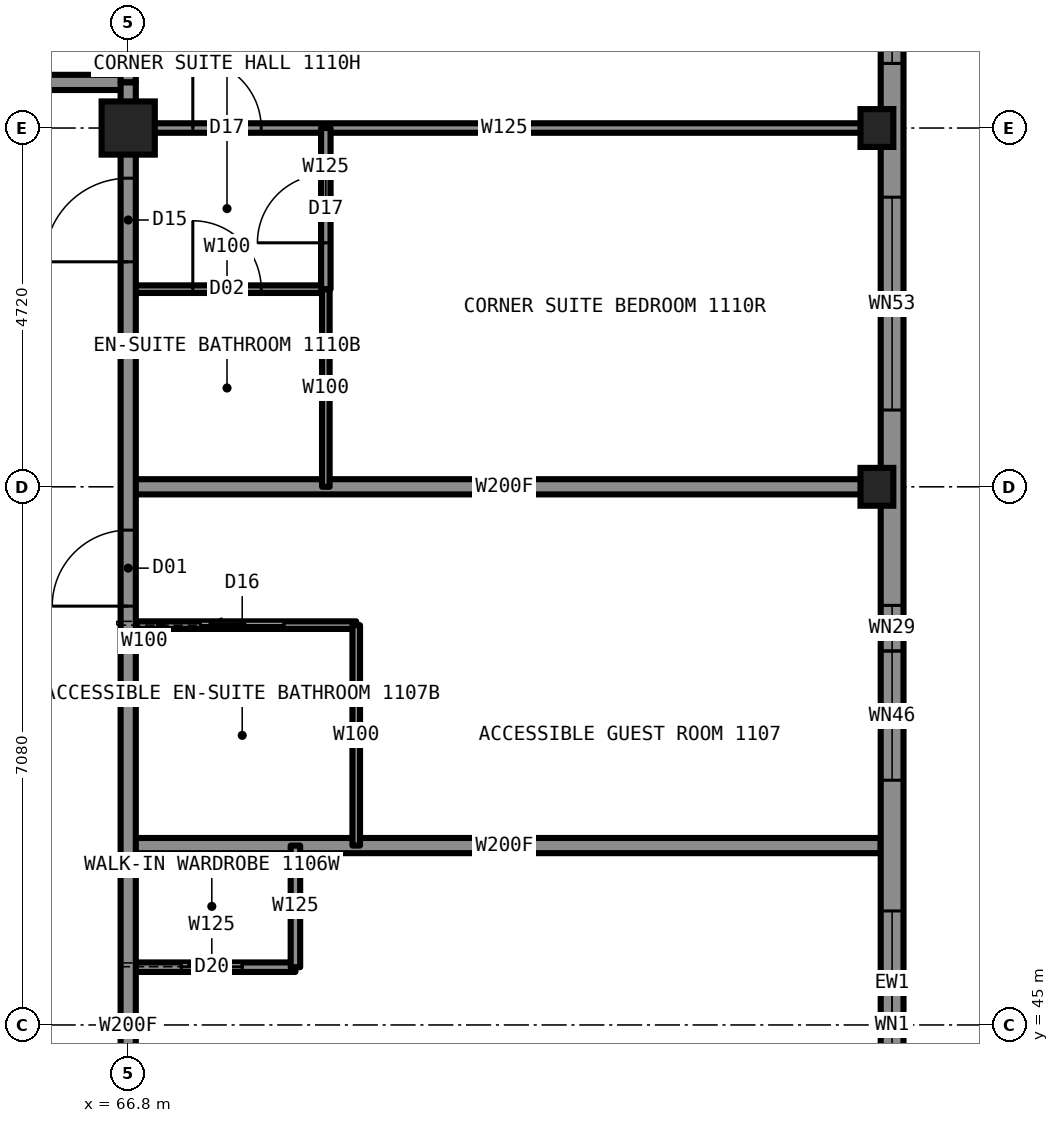
"""IFC4 building model, lengths in metres.
Left out: names, types, materials, properties, quantities, classifications, styles, units other than length and angle.
Written with IfcOpenShell. Run it as: python <this file> out.ifc"""

import sys

from ifc_helpers import new_model, si_unit, direction, frame, frame_2d, origin, origin_2d, place, context, subcontext, project, spatial, rectangle, hollow_rectangle, i_section, extrude, element, fill, save


model = new_model("IFC4")
c1 = context("Model", 3, precision=1e-05, world=origin(), true_north=direction((0.0, 1.0)))
c2 = subcontext(c1, "Body", "Model", "MODEL_VIEW")
j1 = project(units=[si_unit("LENGTHUNIT", "METRE"), si_unit("PLANEANGLEUNIT", "RADIAN")], contexts=[c1])
p1 = place(None, origin())
s1 = spatial("IfcSite", under=j1, at=p1, CompositionType="ELEMENT")
p2 = place(p1, origin())
s2 = spatial("IfcBuilding", under=s1, at=p2, CompositionType="ELEMENT")
p3 = place(p2, frame((0.0, 0.0, 39.0)))
s3 = spatial("IfcBuildingStorey", under=s2, at=p3, CompositionType="ELEMENT", Elevation=39.0)
for number, where, z_axis, x_axis in (
    (1, (76.65, 52.08, 0.0), (0.0, 0.0, 1.0), (1.0, 0.0, 0.0)),
    (2, (76.65, 56.8, 0.0), (0.0, 0.0, 1.0), (1.0, 0.0, 0.0)),
):
    element("IfcColumn", number, at=place(p3, frame(where, z_axis=z_axis, x_axis=x_axis)), inside=s3, PredefinedType="COLUMN", context=c2, shape_type="SweptSolid", body=[
        extrude(i_section(OverallWidth=0.432, OverallDepth=0.498, WebThickness=0.056, FlangeThickness=0.089, at=origin_2d()), origin(), (0.0, 0.0, 1.0), 3.5),
    ])
p4 = place(p3, frame((66.8, 56.8, 0.0), z_axis=(0.0, 0.0, 1.0), x_axis=(1.0, 0.0, 0.0)))
e3 = element("IfcColumn", 3, at=p4, inside=s3, PredefinedType="COLUMN", context=c2, shape_type="SweptSolid", body=[
    extrude(hollow_rectangle(XDim=0.7, YDim=0.7, WallThickness=0.06, at=origin_2d()), origin(), (0.0, 0.0, 1.0), 3.5),
])
p5 = place(p3, frame((66.8, 45.76, 0.0), z_axis=(0.0, 0.0, 1.0), x_axis=(1.0, 0.0, 0.0)))
e4 = element("IfcWall", 4, at=p5, inside=s3, PredefinedType="PARTITIONING", context=c2, shape_type="SweptSolid", body=[
    extrude(rectangle(XDim=2.2, YDim=0.125, at=frame_2d((1.1, 0.0))), origin(), (0.0, 0.0, 1.0), 3.33),
])
p6 = place(p5, frame((0.7, 0.0, 0.0)))
e5 = element("IfcOpeningElement", 5, at=p6, cuts=e4, PredefinedType="OPENING", context=c2, shape_type="SweptSolid", body=[
    extrude(rectangle(XDim=0.8, YDim=2.1, at=frame_2d((0.4, 1.05))), frame((0.0, 0.073, 0.0), z_axis=(0.0, -1.0, 0.0), x_axis=(1.0, 0.0, 0.0)), (0.0, 0.0, 1.0), 0.145),
])
p7 = place(p3, frame((66.8, 56.8, 0.0), z_axis=(0.0, 0.0, 1.0), x_axis=(1.0, 0.0, 0.0)))
e6 = element("IfcWall", 6, at=p7, inside=s3, PredefinedType="PARTITIONING", context=c2, shape_type="SweptSolid", body=[
    extrude(rectangle(XDim=9.9, YDim=0.125, at=frame_2d((4.95, 0.0))), origin(), (0.0, 0.0, 1.0), 2.573),
])
p8 = place(p7, frame((0.85, 0.0, 0.0)))
e7 = element("IfcOpeningElement", 7, at=p8, cuts=e6, PredefinedType="OPENING", context=c2, shape_type="SweptSolid", body=[
    extrude(rectangle(XDim=0.9, YDim=2.2, at=frame_2d((0.45, 1.1))), frame((0.0, 0.073, 0.0), z_axis=(0.0, -1.0, 0.0), x_axis=(1.0, 0.0, 0.0)), (0.0, 0.0, 1.0), 0.145),
])
p9 = place(p3, frame((43.2, 57.4, 0.0), z_axis=(0.0, 0.0, 1.0), x_axis=(1.0, 0.0, 0.0)))
e8 = element("IfcWall", 8, at=p9, inside=s3, PredefinedType="PARTITIONING", context=c2, shape_type="SweptSolid", body=[
    extrude(rectangle(XDim=23.6, YDim=0.2, at=frame_2d((11.8, 0.0))), origin(), (0.0, 0.0, 1.0), 3.33),
])
p10 = place(p9, frame((3.0, 0.0, 0.0)))
e9 = element("IfcOpeningElement", 9, at=p10, cuts=e8, PredefinedType="OPENING", context=c2, shape_type="SweptSolid", body=[
    extrude(rectangle(XDim=1.0, YDim=2.2, at=frame_2d((0.5, 1.1))), frame((0.0, 0.11, 0.0), z_axis=(0.0, -1.0, 0.0), x_axis=(1.0, 0.0, 0.0)), (0.0, 0.0, 1.0), 0.22),
])
p11 = place(p9, frame((11.29, 0.0, 0.0)))
e10 = element("IfcOpeningElement", 10, at=p11, cuts=e8, PredefinedType="OPENING", context=c2, shape_type="SweptSolid", body=[
    extrude(rectangle(XDim=1.1, YDim=2.2, at=frame_2d((0.55, 1.1))), frame((0.0, 0.11, 0.0), z_axis=(0.0, -1.0, 0.0), x_axis=(1.0, 0.0, 0.0)), (0.0, 0.0, 1.0), 0.22),
])
p12 = place(p3, frame((66.8, 47.36, 0.0), z_axis=(0.0, 0.0, 1.0), x_axis=(1.0, 0.0, 0.0)))
e11 = element("IfcWall", 11, at=p12, inside=s3, PredefinedType="PARTITIONING", context=c2, shape_type="SweptSolid", body=[
    extrude(rectangle(XDim=9.9, YDim=0.2, at=frame_2d((4.95, 0.0))), origin(), (0.0, 0.0, 1.0), 2.723),
])
p13 = place(p3, frame((66.8, 50.26, 0.0), z_axis=(0.0, 0.0, 1.0), x_axis=(1.0, 0.0, 0.0)))
e12 = element("IfcWall", 12, at=p13, inside=s3, PredefinedType="PARTITIONING", context=c2, shape_type="SweptSolid", body=[
    extrude(rectangle(XDim=3.0, YDim=0.1, at=frame_2d((1.5, 0.0))), origin(), (0.0, 0.0, 1.0), 3.33),
])
p14 = place(p13, frame((0.95, 0.0, 0.0)))
e13 = element("IfcOpeningElement", 13, at=p14, cuts=e12, PredefinedType="OPENING", context=c2, shape_type="SweptSolid", body=[
    extrude(rectangle(XDim=1.1, YDim=2.1, at=frame_2d((0.55, 1.05))), frame((0.0, 0.06, 0.0), z_axis=(0.0, -1.0, 0.0), x_axis=(1.0, 0.0, 0.0)), (0.0, 0.0, 1.0), 0.12),
])
p15 = place(p3, frame((66.8, 52.08, 0.0), z_axis=(0.0, 0.0, 1.0), x_axis=(1.0, 0.0, 0.0)))
e14 = element("IfcWall", 14, at=p15, inside=s3, PredefinedType="PARTITIONING", context=c2, shape_type="SweptSolid", body=[
    extrude(rectangle(XDim=9.9, YDim=0.2, at=frame_2d((4.95, 0.0))), origin(), (0.0, 0.0, 1.0), 2.573),
])
p16 = place(p3, frame((66.8, 54.68, 0.0), z_axis=(0.0, 0.0, 1.0), x_axis=(1.0, 0.0, 0.0)))
e15 = element("IfcWall", 15, at=p16, inside=s3, PredefinedType="PARTITIONING", context=c2, shape_type="SweptSolid", body=[
    extrude(rectangle(XDim=2.6, YDim=0.1, at=frame_2d((1.3, 0.0))), origin(), (0.0, 0.0, 1.0), 3.33),
])
p17 = place(p16, frame((0.85, 0.0, 0.0)))
e16 = element("IfcOpeningElement", 16, at=p17, cuts=e15, PredefinedType="OPENING", context=c2, shape_type="SweptSolid", body=[
    extrude(rectangle(XDim=0.9, YDim=2.1, at=frame_2d((0.45, 1.05))), frame((0.0, 0.06, 0.0), z_axis=(0.0, -1.0, 0.0), x_axis=(1.0, 0.0, 0.0)), (0.0, 0.0, 1.0), 0.12),
])
p18 = place(p3, frame((66.8, 33.2, 0.0), z_axis=(0.0, 0.0, 1.0), x_axis=(0.0, 1.0, 0.0)))
e17 = element("IfcWall", 17, at=p18, inside=s3, PredefinedType="PARTITIONING", context=c2, shape_type="SweptSolid", body=[
    extrude(rectangle(XDim=23.58, YDim=0.2, at=frame_2d((11.79, 0.0))), origin(), (0.0, 0.0, 1.0), 3.33),
])
p19 = place(p18, frame((7.72, 0.0, 0.0)))
e18 = element("IfcOpeningElement", 18, at=p19, cuts=e17, PredefinedType="OPENING", context=c2, shape_type="SweptSolid", body=[
    extrude(rectangle(XDim=1.0, YDim=2.2, at=frame_2d((0.5, 1.1))), frame((0.0, 0.11, 0.0), z_axis=(0.0, -1.0, 0.0), x_axis=(1.0, 0.0, 0.0)), (0.0, 0.0, 1.0), 0.22),
])
p20 = place(p18, frame((17.31, 0.0, 0.0)))
e19 = element("IfcOpeningElement", 19, at=p20, cuts=e17, PredefinedType="OPENING", context=c2, shape_type="SweptSolid", body=[
    extrude(rectangle(XDim=1.0, YDim=2.2, at=frame_2d((0.5, 1.1))), frame((0.0, 0.11, 0.0), z_axis=(0.0, -1.0, 0.0), x_axis=(1.0, 0.0, 0.0)), (0.0, 0.0, 1.0), 0.22),
])
p21 = place(p18, frame((21.84, 0.0, 0.0)))
e20 = element("IfcOpeningElement", 20, at=p21, cuts=e17, PredefinedType="OPENING", context=c2, shape_type="SweptSolid", body=[
    extrude(rectangle(XDim=1.1, YDim=2.2, at=frame_2d((0.55, 1.1))), frame((0.0, 0.11, 0.0), z_axis=(0.0, -1.0, 0.0), x_axis=(1.0, 0.0, 0.0)), (0.0, 0.0, 1.0), 0.22),
])
p22 = place(p18, frame((0.66, 0.0, 0.0)))
e21 = element("IfcOpeningElement", 21, at=p22, cuts=e17, PredefinedType="OPENING", context=c2, shape_type="SweptSolid", body=[
    extrude(rectangle(XDim=1.1, YDim=2.2, at=frame_2d((0.55, 1.1))), frame((0.0, 0.11, 0.0), z_axis=(0.0, -1.0, 0.0), x_axis=(1.0, 0.0, 0.0)), (0.0, 0.0, 1.0), 0.22),
])
p23 = place(p3, frame((66.8, 57.4, 0.0), z_axis=(0.0, 0.0, 1.0), x_axis=(0.0, 1.0, 0.0)))
e22 = element("IfcWall", 22, at=p23, inside=s3, PredefinedType="PARTITIONING", context=c2, shape_type="SweptSolid", body=[
    extrude(rectangle(XDim=9.3, YDim=0.2, at=frame_2d((4.65, 0.0))), origin(), (0.0, 0.0, 1.0), 2.573),
])
p24 = place(p3, frame((69.0, 45.76, 0.0), z_axis=(0.0, 0.0, 1.0), x_axis=(0.0, 1.0, 0.0)))
e23 = element("IfcWall", 23, at=p24, inside=s3, PredefinedType="PARTITIONING", context=c2, shape_type="SweptSolid", body=[
    extrude(rectangle(XDim=1.6, YDim=0.125, at=frame_2d((0.8, 0.0))), origin(), (0.0, 0.0, 1.0), 3.33),
])
p25 = place(p3, frame((69.4, 52.08, 0.0), z_axis=(0.0, 0.0, 1.0), x_axis=(0.0, 1.0, 0.0)))
e24 = element("IfcWall", 24, at=p25, inside=s3, PredefinedType="PARTITIONING", context=c2, shape_type="SweptSolid", body=[
    extrude(rectangle(XDim=2.6, YDim=0.1, at=frame_2d((1.3, 0.0))), origin(), (0.0, 0.0, 1.0), 3.33),
])
p26 = place(p3, frame((69.4, 54.68, 0.0), z_axis=(0.0, 0.0, 1.0), x_axis=(0.0, 1.0, 0.0)))
e25 = element("IfcWall", 25, at=p26, inside=s3, PredefinedType="PARTITIONING", context=c2, shape_type="SweptSolid", body=[
    extrude(rectangle(XDim=2.12, YDim=0.125, at=frame_2d((1.06, 0.0))), origin(), (0.0, 0.0, 1.0), 3.33),
])
p27 = place(p26, frame((0.61, 0.0, 0.0)))
e26 = element("IfcOpeningElement", 26, at=p27, cuts=e25, PredefinedType="OPENING", context=c2, shape_type="SweptSolid", body=[
    extrude(rectangle(XDim=0.9, YDim=2.2, at=frame_2d((0.45, 1.1))), frame((0.0, 0.073, 0.0), z_axis=(0.0, -1.0, 0.0), x_axis=(1.0, 0.0, 0.0)), (0.0, 0.0, 1.0), 0.145),
])
p28 = place(p3, frame((69.8, 47.36, 0.0), z_axis=(0.0, 0.0, 1.0), x_axis=(0.0, 1.0, 0.0)))
e27 = element("IfcWall", 27, at=p28, inside=s3, PredefinedType="PARTITIONING", context=c2, shape_type="SweptSolid", body=[
    extrude(rectangle(XDim=2.9, YDim=0.1, at=frame_2d((1.45, 0.0))), origin(), (0.0, 0.0, 1.0), 3.33),
])
p29 = place(p3, frame((76.85, 28.5, 0.0), z_axis=(0.0, 0.0, 1.0), x_axis=(0.0, 1.0, 0.0)))
e28 = element("IfcWall", 28, at=p29, inside=s3, PredefinedType="SOLIDWALL", context=c2, shape_type="SweptSolid", body=[
    extrude(rectangle(XDim=33.0, YDim=0.3, at=frame_2d((16.5, 0.0))), origin(), (0.0, 0.0, 1.0), 2.83),
])
p30 = place(p29, frame((0.85, 0.0, 0.5)))
e29 = element("IfcOpeningElement", 29, at=p30, cuts=e28, PredefinedType="OPENING", context=c2, shape_type="SweptSolid", body=[
    extrude(rectangle(XDim=2.5, YDim=2.0, at=frame_2d((1.25, 1.0))), frame((0.0, 0.16, 0.0), z_axis=(0.0, -1.0, 0.0), x_axis=(1.0, 0.0, 0.0)), (0.0, 0.0, 1.0), 0.32),
])
p31 = place(p29, frame((6.61, 0.0, 0.5)))
e30 = element("IfcOpeningElement", 30, at=p31, cuts=e28, PredefinedType="OPENING", context=c2, shape_type="SweptSolid", body=[
    extrude(rectangle(XDim=1.9, YDim=1.9, at=frame_2d((0.95, 0.95))), frame((0.0, 0.16, 0.0), z_axis=(0.0, -1.0, 0.0), x_axis=(1.0, 0.0, 0.0)), (0.0, 0.0, 1.0), 0.32),
])
p32 = place(p29, frame((10.28, 0.0, 0.5)))
e31 = element("IfcOpeningElement", 31, at=p32, cuts=e28, PredefinedType="OPENING", context=c2, shape_type="SweptSolid", body=[
    extrude(rectangle(XDim=3.0, YDim=2.0, at=frame_2d((1.5, 1.0))), frame((0.0, 0.16, 0.0), z_axis=(0.0, -1.0, 0.0), x_axis=(1.0, 0.0, 0.0)), (0.0, 0.0, 1.0), 0.32),
])
p33 = place(p29, frame((15.0, 0.0, 0.5)))
e32 = element("IfcOpeningElement", 32, at=p33, cuts=e28, PredefinedType="OPENING", context=c2, shape_type="SweptSolid", body=[
    extrude(rectangle(XDim=3.0, YDim=2.0, at=frame_2d((1.5, 1.0))), frame((0.0, 0.16, 0.0), z_axis=(0.0, -1.0, 0.0), x_axis=(1.0, 0.0, 0.0)), (0.0, 0.0, 1.0), 0.32),
])
p34 = place(p29, frame((19.72, 0.0, 0.5)))
e33 = element("IfcOpeningElement", 33, at=p34, cuts=e28, PredefinedType="OPENING", context=c2, shape_type="SweptSolid", body=[
    extrude(rectangle(XDim=3.0, YDim=2.0, at=frame_2d((1.5, 1.0))), frame((0.0, 0.16, 0.0), z_axis=(0.0, -1.0, 0.0), x_axis=(1.0, 0.0, 0.0)), (0.0, 0.0, 1.0), 0.32),
])
p35 = place(p29, frame((24.44, 0.0, 0.5)))
e34 = element("IfcOpeningElement", 34, at=p35, cuts=e28, PredefinedType="OPENING", context=c2, shape_type="SweptSolid", body=[
    extrude(rectangle(XDim=1.9, YDim=1.9, at=frame_2d((0.95, 0.95))), frame((0.0, 0.16, 0.0), z_axis=(0.0, -1.0, 0.0), x_axis=(1.0, 0.0, 0.0)), (0.0, 0.0, 1.0), 0.32),
])
p36 = place(p29, frame((29.6, 0.0, 0.5)))
e35 = element("IfcOpeningElement", 35, at=p36, cuts=e28, PredefinedType="OPENING", context=c2, shape_type="SweptSolid", body=[
    extrude(rectangle(XDim=2.5, YDim=2.0, at=frame_2d((1.25, 1.0))), frame((0.0, 0.16, 0.0), z_axis=(0.0, -1.0, 0.0), x_axis=(1.0, 0.0, 0.0)), (0.0, 0.0, 1.0), 0.32),
])
p37 = place(p29, frame((5.91, 0.0, 0.5)))
e36 = element("IfcOpeningElement", 36, at=p37, cuts=e28, PredefinedType="OPENING", context=c2, shape_type="SweptSolid", body=[
    extrude(rectangle(XDim=0.7, YDim=1.0, at=frame_2d((0.35, 0.5))), frame((0.0, 0.16, 0.0), z_axis=(0.0, -1.0, 0.0), x_axis=(1.0, 0.0, 0.0)), (0.0, 0.0, 1.0), 0.32),
])
p38 = place(p29, frame((26.39, 0.0, 0.5)))
e37 = element("IfcOpeningElement", 37, at=p38, cuts=e28, PredefinedType="OPENING", context=c2, shape_type="SweptSolid", body=[
    extrude(rectangle(XDim=0.7, YDim=1.0, at=frame_2d((0.35, 0.5))), frame((0.0, 0.16, 0.0), z_axis=(0.0, -1.0, 0.0), x_axis=(1.0, 0.0, 0.0)), (0.0, 0.0, 1.0), 0.32),
])
p39 = place(p3, frame((66.8, 56.78, 0.0), z_axis=(0.0, 0.0, 1.0), x_axis=(0.0, 1.0, 0.0)))
e38 = element("IfcWall", 38, at=p39, inside=s3, PredefinedType="PARTITIONING", context=c2, shape_type="SweptSolid", body=[
    extrude(rectangle(XDim=0.62, YDim=0.2, at=frame_2d((0.31, 0.0))), origin(), (0.0, 0.0, 1.0), 2.573),
])
p40 = place(p6, origin())
e39 = element("IfcDoor", 39, at=p40, inside=s3, OperationType="SLIDING_TO_LEFT", PredefinedType="DOOR", context=c2, shape_type="SweptSolid", body=[
    extrude(rectangle(XDim=0.8, YDim=2.1, at=frame_2d((0.4, 1.05))), frame((0.0, 0.025, 0.0), z_axis=(0.0, -1.0, 0.0), x_axis=(1.0, 0.0, 0.0)), (0.0, 0.0, 1.0), 0.05),
])
fill(e5, e39)
p41 = place(p20, origin())
e40 = element("IfcDoor", 40, at=p41, inside=s3, OperationType="SINGLE_SWING_LEFT", PredefinedType="DOOR", context=c2, shape_type="SweptSolid", body=[
    extrude(rectangle(XDim=1.0, YDim=2.2, at=frame_2d((0.5, 1.1))), frame((0.0, 0.025, 0.0), z_axis=(0.0, -1.0, 0.0), x_axis=(1.0, 0.0, 0.0)), (0.0, 0.0, 1.0), 0.05),
])
fill(e19, e40)
p42 = place(p14, origin())
e41 = element("IfcDoor", 41, at=p42, inside=s3, OperationType="SLIDING_TO_LEFT", PredefinedType="DOOR", context=c2, shape_type="SweptSolid", body=[
    extrude(rectangle(XDim=1.1, YDim=2.1, at=frame_2d((0.55, 1.05))), frame((0.0, 0.025, 0.0), z_axis=(0.0, -1.0, 0.0), x_axis=(1.0, 0.0, 0.0)), (0.0, 0.0, 1.0), 0.05),
])
fill(e13, e41)
p43 = place(p8, origin())
e42 = element("IfcDoor", 42, at=p43, inside=s3, OperationType="SINGLE_SWING_LEFT", PredefinedType="DOOR", context=c2, shape_type="SweptSolid", body=[
    extrude(rectangle(XDim=0.9, YDim=2.2, at=frame_2d((0.45, 1.1))), frame((0.0, 0.025, 0.0), z_axis=(0.0, -1.0, 0.0), x_axis=(1.0, 0.0, 0.0)), (0.0, 0.0, 1.0), 0.05),
])
fill(e7, e42)
p44 = place(p17, origin())
e43 = element("IfcDoor", 43, at=p44, inside=s3, OperationType="SINGLE_SWING_RIGHT", PredefinedType="DOOR", context=c2, shape_type="SweptSolid", body=[
    extrude(rectangle(XDim=0.9, YDim=2.1, at=frame_2d((0.45, 1.05))), frame((0.0, 0.025, 0.0), z_axis=(0.0, -1.0, 0.0), x_axis=(1.0, 0.0, 0.0)), (0.0, 0.0, 1.0), 0.05),
])
fill(e16, e43)
p45 = place(p21, origin())
e44 = element("IfcDoor", 44, at=p45, inside=s3, OperationType="SINGLE_SWING_LEFT", PredefinedType="DOOR", context=c2, shape_type="SweptSolid", body=[
    extrude(rectangle(XDim=1.1, YDim=2.2, at=frame_2d((0.55, 1.1))), frame((0.0, 0.025, 0.0), z_axis=(0.0, -1.0, 0.0), x_axis=(1.0, 0.0, 0.0)), (0.0, 0.0, 1.0), 0.05),
])
fill(e20, e44)
p46 = place(p27, origin())
e45 = element("IfcDoor", 45, at=p46, inside=s3, OperationType="SINGLE_SWING_LEFT", PredefinedType="DOOR", context=c2, shape_type="SweptSolid", body=[
    extrude(rectangle(XDim=0.9, YDim=2.2, at=frame_2d((0.45, 1.1))), frame((0.0, 0.025, 0.0), z_axis=(0.0, -1.0, 0.0), x_axis=(1.0, 0.0, 0.0)), (0.0, 0.0, 1.0), 0.05),
])
fill(e26, e45)
p47 = place(p33, origin())
e46 = element("IfcWindow", 46, at=p47, inside=s3, PartitioningType="SINGLE_PANEL", PredefinedType="WINDOW", context=c2, shape_type="SweptSolid", body=[
    extrude(rectangle(XDim=3.0, YDim=2.0, at=frame_2d((1.5, 1.0))), frame((0.0, 0.03, 0.0), z_axis=(0.0, -1.0, 0.0), x_axis=(1.0, 0.0, 0.0)), (0.0, 0.0, 1.0), 0.06),
])
fill(e32, e46)
p48 = place(p34, origin())
e47 = element("IfcWindow", 47, at=p48, inside=s3, PartitioningType="SINGLE_PANEL", PredefinedType="WINDOW", context=c2, shape_type="SweptSolid", body=[
    extrude(rectangle(XDim=3.0, YDim=2.0, at=frame_2d((1.5, 1.0))), frame((0.0, 0.03, 0.0), z_axis=(0.0, -1.0, 0.0), x_axis=(1.0, 0.0, 0.0)), (0.0, 0.0, 1.0), 0.06),
])
fill(e33, e47)
p49 = place(p35, origin())
e48 = element("IfcWindow", 48, at=p49, inside=s3, PartitioningType="SINGLE_PANEL", PredefinedType="WINDOW", context=c2, shape_type="SweptSolid", body=[
    extrude(rectangle(XDim=1.9, YDim=1.9, at=frame_2d((0.95, 0.95))), frame((0.0, 0.03, 0.0), z_axis=(0.0, -1.0, 0.0), x_axis=(1.0, 0.0, 0.0)), (0.0, 0.0, 1.0), 0.06),
])
fill(e34, e48)
p50 = place(p38, origin())
e49 = element("IfcWindow", 49, at=p50, inside=s3, PartitioningType="SINGLE_PANEL", PredefinedType="WINDOW", context=c2, shape_type="SweptSolid", body=[
    extrude(rectangle(XDim=0.7, YDim=1.0, at=frame_2d((0.35, 0.5))), frame((0.0, 0.03, 0.0), z_axis=(0.0, -1.0, 0.0), x_axis=(1.0, 0.0, 0.0)), (0.0, 0.0, 1.0), 0.06),
])
fill(e37, e49)
save(model, sys.argv[1])
